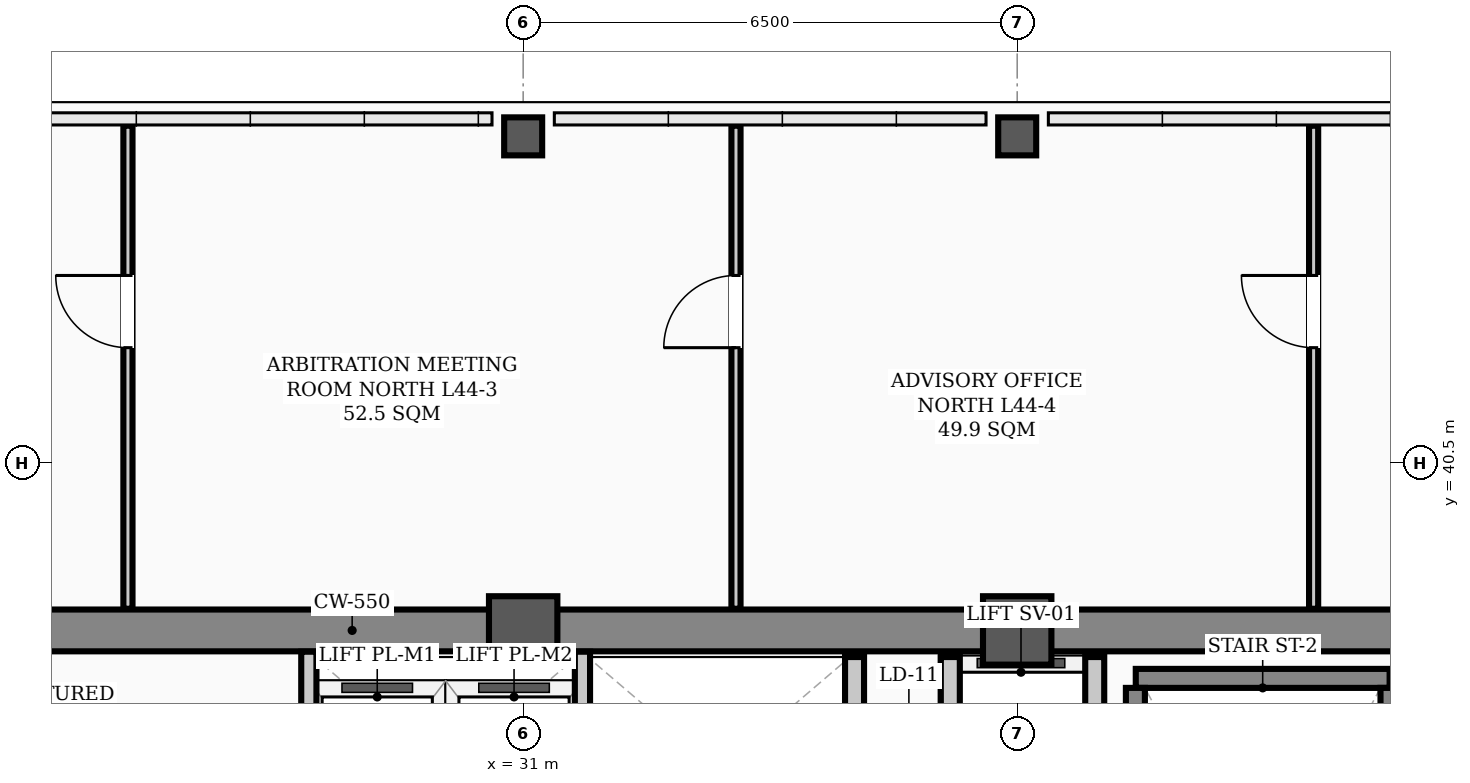
"""IFC4 building model, lengths in metres.
Left out: names, types, materials, properties, quantities, classifications, styles, units other than length and angle.
Written with IfcOpenShell. Run it as: python <this file> out.ifc"""

import sys

from ifc_helpers import new_model, si_unit, direction, frame, frame_2d, origin, origin_2d, place, context, subcontext, project, spatial, rectangle, hollow_rectangle, extrude, element, fill, save


model = new_model("IFC4")
c1 = context("Model", 3, precision=1e-05, world=origin(), true_north=direction((0.0, 1.0)))
c2 = subcontext(c1, "Body", "Model", "MODEL_VIEW")
j1 = project(units=[si_unit("LENGTHUNIT", "METRE"), si_unit("PLANEANGLEUNIT", "RADIAN")], contexts=[c1])
p1 = place(None, origin())
s1 = spatial("IfcSite", under=j1, at=p1, CompositionType="ELEMENT")
p2 = place(p1, origin())
s2 = spatial("IfcBuilding", under=s1, at=p2, CompositionType="ELEMENT")
p3 = place(p2, frame((0.0, 0.0, 177.3)))
s3 = spatial("IfcBuildingStorey", under=s2, at=p3, CompositionType="ELEMENT", Elevation=177.3)
for number, where, z_axis, x_axis in (
    (1, (31.0, 38.3, 0.0), (0.0, 0.0, 1.0), (1.0, 0.0, 0.0)),
    (2, (37.5, 38.3, 0.0), (0.0, 0.0, 1.0), (1.0, 0.0, 0.0)),
):
    element("IfcColumn", number, at=place(p3, frame(where, z_axis=z_axis, x_axis=x_axis)), inside=s3, PredefinedType="COLUMN", context=c2, shape_type="SweptSolid", body=[
        extrude(hollow_rectangle(XDim=0.9, YDim=0.9, WallThickness=0.035, InnerFilletRadius=0.017, OuterFilletRadius=0.052, at=origin_2d()), origin(), (0.0, 0.0, 1.0), 3.9),
    ])
for number, where, z_axis, x_axis in (
    (3, (31.0, 44.8, 0.0), (0.0, 0.0, 1.0), (1.0, 0.0, 0.0)),
    (4, (37.5, 44.8, 0.0), (0.0, 0.0, 1.0), (1.0, 0.0, 0.0)),
):
    element("IfcColumn", number, at=place(p3, frame(where, z_axis=z_axis, x_axis=x_axis)), inside=s3, PredefinedType="COLUMN", context=c2, shape_type="SweptSolid", body=[
        extrude(hollow_rectangle(XDim=0.5, YDim=0.5, WallThickness=0.024, InnerFilletRadius=0.012, OuterFilletRadius=0.036, at=origin_2d()), origin(), (0.0, 0.0, 1.0), 3.9),
    ])
p4 = place(p3, frame((13.5, 38.3, 0.0), z_axis=(0.0, 0.0, 1.0), x_axis=(1.0, 0.0, 0.0)))
e5 = element("IfcWall", 5, at=p4, inside=s3, PredefinedType="SHEAR", context=c2, shape_type="SweptSolid", body=[
    extrude(rectangle(XDim=30.5, YDim=0.55, at=frame_2d((15.25, 0.0))), origin(), (0.0, 0.0, 1.0), 3.72),
])
p5 = place(p3, frame((39.06, 37.669, 0.0), z_axis=(0.0, 0.0, 1.0), x_axis=(1.0, 0.0, 0.0)))
e6 = element("IfcWall", 6, at=p5, inside=s3, PredefinedType="STANDARD", context=c2, shape_type="SweptSolid", body=[
    extrude(rectangle(XDim=3.34, YDim=0.25, at=frame_2d((1.67, 0.0))), origin(), (0.0, 0.0, 1.0), 3.72),
])
for number, where, z_axis, x_axis in (
    (7, (39.055, 30.36, 0.0), (0.0, 0.0, 1.0), (0.0, 1.0, 0.0)),
    (8, (42.405, 30.36, 0.0), (0.0, 0.0, 1.0), (0.0, 1.0, 0.0)),
):
    element("IfcWall", number, at=place(p3, frame(where, z_axis=z_axis, x_axis=x_axis)), inside=s3, PredefinedType="STANDARD", context=c2, shape_type="SweptSolid", body=[
        extrude(rectangle(XDim=7.184, YDim=0.25, at=frame_2d((3.592, 0.0))), origin(), (0.0, 0.0, 1.0), 3.72),
    ])
p6 = place(p3, frame((36.62, 31.95, 0.0), z_axis=(0.0, 0.0, 1.0), x_axis=(0.0, 1.0, 0.0)))
e9 = element("IfcWall", 9, at=p6, inside=s3, PredefinedType="STANDARD", context=c2, shape_type="SweptSolid", body=[
    extrude(rectangle(XDim=6.0, YDim=0.25, at=frame_2d((3.0, 0.0))), origin(), (0.0, 0.0, 1.0), 3.35),
])
p7 = place(p6, frame((0.9, 0.0, 0.0)))
e10 = element("IfcOpeningElement", 10, at=p7, cuts=e9, PredefinedType="OPENING", context=c2, shape_type="SweptSolid", body=[
    extrude(rectangle(XDim=1.1, YDim=2.08, at=frame_2d((0.55, 1.04))), frame((0.0, 0.135, 0.0), z_axis=(0.0, -1.0, 0.0), x_axis=(1.0, 0.0, 0.0)), (0.0, 0.0, 1.0), 0.27),
])
p8 = place(p6, frame((4.0, 0.0, 0.0)))
e11 = element("IfcOpeningElement", 11, at=p8, cuts=e9, PredefinedType="OPENING", context=c2, shape_type="SweptSolid", body=[
    extrude(rectangle(XDim=1.1, YDim=2.08, at=frame_2d((0.55, 1.04))), frame((0.0, 0.135, 0.0), z_axis=(0.0, -1.0, 0.0), x_axis=(1.0, 0.0, 0.0)), (0.0, 0.0, 1.0), 0.27),
])
p9 = place(p3, frame((38.52, 31.95, 0.0), z_axis=(0.0, 0.0, 1.0), x_axis=(0.0, 1.0, 0.0)))
e12 = element("IfcWall", 12, at=p9, inside=s3, PredefinedType="STANDARD", context=c2, shape_type="SweptSolid", body=[
    extrude(rectangle(XDim=6.0, YDim=0.25, at=frame_2d((3.0, 0.0))), origin(), (0.0, 0.0, 1.0), 3.35),
])
p10 = place(p3, frame((35.36, 34.9, 0.0), z_axis=(0.0, 0.0, 1.0), x_axis=(0.0, 1.0, 0.0)))
e13 = element("IfcWall", 13, at=p10, inside=s3, PredefinedType="STANDARD", context=c2, shape_type="SweptSolid", body=[
    extrude(rectangle(XDim=3.05, YDim=0.25, at=frame_2d((1.525, 0.0))), origin(), (0.0, 0.0, 1.0), 3.35),
])
p11 = place(p3, frame((25.8, 38.585, 0.0), z_axis=(0.0, 0.0, 1.0), x_axis=(0.0, 1.0, 0.0)))
e14 = element("IfcWall", 14, at=p11, inside=s3, PredefinedType="PARTITIONING", context=c2, shape_type="SweptSolid", body=[
    extrude(rectangle(XDim=6.355, YDim=0.12, at=frame_2d((3.177, 0.0))), origin(), (0.0, 0.0, 1.0), 3.212),
])
p12 = place(p11, frame((3.435, 0.0, 0.0)))
e15 = element("IfcOpeningElement", 15, at=p12, cuts=e14, PredefinedType="OPENING", context=c2, shape_type="SweptSolid", body=[
    extrude(rectangle(XDim=0.95, YDim=2.08, at=frame_2d((0.475, 1.04))), frame((0.0, 0.07, 0.0), z_axis=(0.0, -1.0, 0.0), x_axis=(1.0, 0.0, 0.0)), (0.0, 0.0, 1.0), 0.14),
])
p13 = place(p3, frame((33.8, 38.585, 0.0), z_axis=(0.0, 0.0, 1.0), x_axis=(0.0, 1.0, 0.0)))
e16 = element("IfcWall", 16, at=p13, inside=s3, PredefinedType="PARTITIONING", context=c2, shape_type="SweptSolid", body=[
    extrude(rectangle(XDim=6.355, YDim=0.12, at=frame_2d((3.177, 0.0))), origin(), (0.0, 0.0, 1.0), 3.212),
])
p14 = place(p13, frame((3.435, 0.0, 0.0)))
e17 = element("IfcOpeningElement", 17, at=p14, cuts=e16, PredefinedType="OPENING", context=c2, shape_type="SweptSolid", body=[
    extrude(rectangle(XDim=0.95, YDim=2.08, at=frame_2d((0.475, 1.04))), frame((0.0, 0.07, 0.0), z_axis=(0.0, -1.0, 0.0), x_axis=(1.0, 0.0, 0.0)), (0.0, 0.0, 1.0), 0.14),
])
p15 = place(p3, frame((41.4, 38.585, 0.0), z_axis=(0.0, 0.0, 1.0), x_axis=(0.0, 1.0, 0.0)))
e18 = element("IfcWall", 18, at=p15, inside=s3, PredefinedType="PARTITIONING", context=c2, shape_type="SweptSolid", body=[
    extrude(rectangle(XDim=6.355, YDim=0.12, at=frame_2d((3.177, 0.0))), origin(), (0.0, 0.0, 1.0), 3.212),
])
p16 = place(p15, frame((3.435, 0.0, 0.0)))
e19 = element("IfcOpeningElement", 19, at=p16, cuts=e18, PredefinedType="OPENING", context=c2, shape_type="SweptSolid", body=[
    extrude(rectangle(XDim=0.95, YDim=2.08, at=frame_2d((0.475, 1.04))), frame((0.0, 0.07, 0.0), z_axis=(0.0, -1.0, 0.0), x_axis=(1.0, 0.0, 0.0)), (0.0, 0.0, 1.0), 0.14),
])
for number, where, z_axis, x_axis in (
    (20, (28.18, 34.9, 0.0), (0.0, 0.0, 1.0), (0.0, 1.0, 0.0)),
    (21, (31.78, 34.9, 0.0), (0.0, 0.0, 1.0), (0.0, 1.0, 0.0)),
):
    element("IfcWall", number, at=place(p3, frame(where, z_axis=z_axis, x_axis=x_axis)), inside=s3, PredefinedType="STANDARD", context=c2, shape_type="SweptSolid", body=[
        extrude(rectangle(XDim=3.12, YDim=0.2, at=frame_2d((1.56, 0.0))), origin(), (0.0, 0.0, 1.0), 3.35),
    ])
p17 = place(p12, origin())
e22 = element("IfcDoor", 22, at=p17, inside=s3, OperationType="SINGLE_SWING_RIGHT", PredefinedType="DOOR", context=c2, shape_type="SweptSolid", body=[
    extrude(rectangle(XDim=0.95, YDim=2.08, at=frame_2d((0.475, 1.04))), frame((0.0, 0.025, 0.0), z_axis=(0.0, -1.0, 0.0), x_axis=(1.0, 0.0, 0.0)), (0.0, 0.0, 1.0), 0.05),
])
fill(e15, e22)
p18 = place(p14, origin())
e23 = element("IfcDoor", 23, at=p18, inside=s3, OperationType="SINGLE_SWING_LEFT", PredefinedType="DOOR", context=c2, shape_type="SweptSolid", body=[
    extrude(rectangle(XDim=0.95, YDim=2.08, at=frame_2d((0.475, 1.04))), frame((0.0, 0.025, 0.0), z_axis=(0.0, -1.0, 0.0), x_axis=(1.0, 0.0, 0.0)), (0.0, 0.0, 1.0), 0.05),
])
fill(e17, e23)
p19 = place(p16, origin())
e24 = element("IfcDoor", 24, at=p19, inside=s3, OperationType="SINGLE_SWING_RIGHT", PredefinedType="DOOR", context=c2, shape_type="SweptSolid", body=[
    extrude(rectangle(XDim=0.95, YDim=2.08, at=frame_2d((0.475, 1.04))), frame((0.0, 0.025, 0.0), z_axis=(0.0, -1.0, 0.0), x_axis=(1.0, 0.0, 0.0)), (0.0, 0.0, 1.0), 0.05),
])
fill(e19, e24)
save(model, sys.argv[1])
